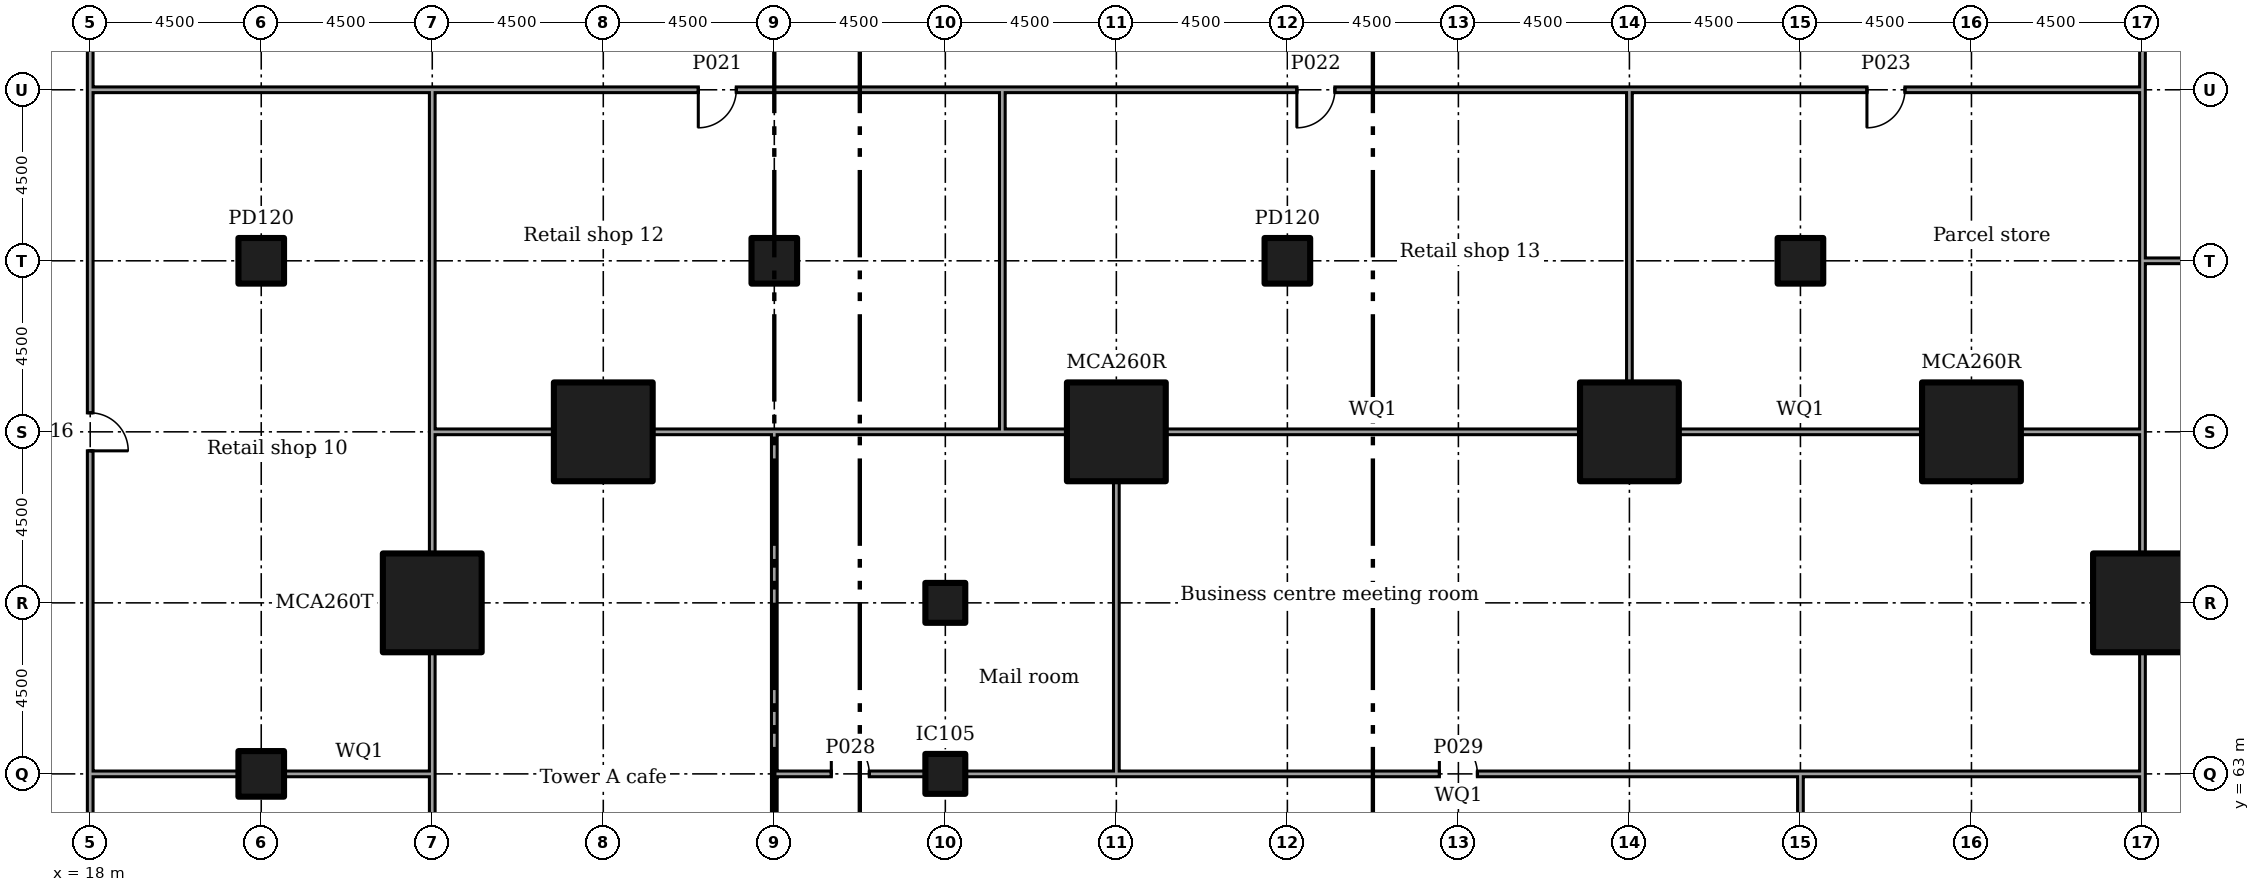
"""IFC4 building model, lengths in metres.
Left out: names, types, materials, properties, quantities, classifications, styles, units other than length and angle.
Written with IfcOpenShell. Run it as: python <this file> out.ifc"""

import sys

from ifc_helpers import new_model, si_unit, direction, frame, frame_2d, origin, origin_2d, place, context, subcontext, project, spatial, rectangle, extrude, element, fill, save


model = new_model("IFC4")
c1 = context("Model", 3, precision=1e-05, world=origin(), true_north=direction((0.0, 1.0)))
c2 = subcontext(c1, "Body", "Model", "MODEL_VIEW")
j1 = project(units=[si_unit("LENGTHUNIT", "METRE"), si_unit("PLANEANGLEUNIT", "RADIAN")], contexts=[c1])
p1 = place(None, origin())
s1 = spatial("IfcSite", under=j1, at=p1, CompositionType="ELEMENT")
p2 = place(p1, origin())
s2 = spatial("IfcBuilding", under=s1, at=p2, CompositionType="ELEMENT")
p3 = place(p2, origin())
s3 = spatial("IfcBuildingStorey", under=s2, at=p3, CompositionType="ELEMENT", Elevation=0.0)
for number, where in (
    (1, (27.0, 67.5, 0.0)),
    (2, (31.5, 72.0, 0.0)),
    (3, (45.0, 72.0, 0.0)),
    (4, (58.5, 72.0, 0.0)),
    (5, (67.5, 72.0, 0.0)),
    (6, (72.0, 67.5, 0.0)),
):
    element("IfcColumn", number, at=place(p3, frame(where)), inside=s3, PredefinedType="COLUMN", context=c2, shape_type="SweptSolid", body=[
        extrude(rectangle(XDim=2.6, YDim=2.6, at=origin_2d()), origin(), (0.0, 0.0, 1.0), 6.0),
    ])
for number, where in (
    (7, (40.5, 63.0, 0.0)),
    (8, (40.5, 67.5, 0.0)),
):
    element("IfcColumn", number, at=place(p3, frame(where)), inside=s3, PredefinedType="COLUMN", context=c2, shape_type="SweptSolid", body=[
        extrude(rectangle(XDim=1.05, YDim=1.05, at=origin_2d()), origin(), (0.0, 0.0, 1.0), 6.0),
    ])
for number, where in (
    (9, (22.5, 63.0, 0.0)),
    (10, (22.5, 76.5, 0.0)),
    (11, (36.0, 76.5, 0.0)),
    (12, (49.5, 76.5, 0.0)),
    (13, (63.0, 76.5, 0.0)),
):
    element("IfcColumn", number, at=place(p3, frame(where)), inside=s3, PredefinedType="COLUMN", context=c2, shape_type="SweptSolid", body=[
        extrude(rectangle(XDim=1.2, YDim=1.2, at=origin_2d()), origin(), (0.0, 0.0, 1.0), 6.0),
    ])
p4 = place(p3, frame((71.925, 76.5, 0.0)))
e14 = element("IfcWall", 14, at=p4, inside=s3, PredefinedType="PARTITIONING", context=c2, shape_type="SweptSolid", body=[
    extrude(rectangle(XDim=3.98, YDim=0.15, at=frame_2d((1.99, 0.0))), origin(), (0.0, 0.0, 1.0), 5.55),
])
p5 = place(p4, frame((1.125, 0.0, 0.0)))
e15 = element("IfcOpeningElement", 15, at=p5, cuts=e14, PredefinedType="OPENING", context=c2, shape_type="SweptSolid", body=[
    extrude(rectangle(XDim=1.8, YDim=2.1, at=frame_2d((0.9, 1.05))), frame((0.0, 0.085, 0.0), z_axis=(0.0, -1.0, 0.0), x_axis=(1.0, 0.0, 0.0)), (0.0, 0.0, 1.0), 0.17),
])
p6 = place(p3, frame((72.0, 71.925, 0.0), z_axis=(0.0, 0.0, 1.0), x_axis=(0.0, 1.0, 0.0)))
e16 = element("IfcWall", 16, at=p6, inside=s3, PredefinedType="PARTITIONING", context=c2, shape_type="SweptSolid", body=[
    extrude(rectangle(XDim=4.5, YDim=0.15, at=frame_2d((2.25, 0.0))), origin(), (0.0, 0.0, 1.0), 5.55),
])
p7 = place(p3, frame((72.0, 62.925, 0.0), z_axis=(0.0, 0.0, 1.0), x_axis=(0.0, 1.0, 0.0)))
e17 = element("IfcWall", 17, at=p7, inside=s3, PredefinedType="PARTITIONING", context=c2, shape_type="SweptSolid", body=[
    extrude(rectangle(XDim=3.28, YDim=0.15, at=frame_2d((1.64, 0.0))), origin(), (0.0, 0.0, 1.0), 5.55),
])
for number, where, z_axis, x_axis in (
    (18, (72.0, 68.795, 0.0), (0.0, 0.0, 1.0), (0.0, 1.0, 0.0)),
    (19, (72.0, 59.795, 0.0), (0.0, 0.0, 1.0), (0.0, 1.0, 0.0)),
):
    element("IfcWall", number, at=place(p3, frame(where, z_axis=z_axis, x_axis=x_axis)), inside=s3, PredefinedType="PARTITIONING", context=c2, shape_type="SweptSolid", body=[
        extrude(rectangle(XDim=3.205, YDim=0.15, at=frame_2d((1.603, 0.0))), origin(), (0.0, 0.0, 1.0), 5.55),
    ])
p8 = place(p3, frame((72.0, 80.925, 0.0), z_axis=(0.0, 0.0, 1.0), x_axis=(0.0, 1.0, 0.0)))
e20 = element("IfcWall", 20, at=p8, inside=s3, PredefinedType="PARTITIONING", context=c2, shape_type="SweptSolid", body=[
    extrude(rectangle(XDim=9.15, YDim=0.15, at=frame_2d((4.575, 0.0))), origin(), (0.0, 0.0, 1.0), 5.55),
])
p9 = place(p8, frame((3.675, 0.0, 0.0)))
e21 = element("IfcOpeningElement", 21, at=p9, cuts=e20, PredefinedType="OPENING", context=c2, shape_type="SweptSolid", body=[
    extrude(rectangle(XDim=1.8, YDim=2.1, at=frame_2d((0.9, 1.05))), frame((0.0, 0.085, 0.0), z_axis=(0.0, -1.0, 0.0), x_axis=(1.0, 0.0, 0.0)), (0.0, 0.0, 1.0), 0.17),
])
p10 = place(p3, frame((72.0, 76.5, 0.0), z_axis=(0.0, 0.0, 1.0), x_axis=(0.0, 1.0, 0.0)))
e22 = element("IfcWall", 22, at=p10, inside=s3, PredefinedType="PARTITIONING", context=c2, shape_type="SweptSolid", body=[
    extrude(rectangle(XDim=4.5, YDim=0.15, at=frame_2d((2.25, 0.0))), origin(), (0.0, 0.0, 1.0), 5.55),
])
p11 = place(p3, frame((18.0, 80.925, 0.0), z_axis=(0.0, 0.0, 1.0), x_axis=(0.0, 1.0, 0.0)))
e23 = element("IfcWall", 23, at=p11, inside=s3, PredefinedType="PARTITIONING", context=c2, shape_type="SweptSolid", body=[
    extrude(rectangle(XDim=9.15, YDim=0.15, at=frame_2d((4.575, 0.0))), origin(), (0.0, 0.0, 1.0), 5.55),
])
p12 = place(p11, frame((3.675, 0.0, 0.0)))
e24 = element("IfcOpeningElement", 24, at=p12, cuts=e23, PredefinedType="OPENING", context=c2, shape_type="SweptSolid", body=[
    extrude(rectangle(XDim=1.8, YDim=2.1, at=frame_2d((0.9, 1.05))), frame((0.0, 0.085, 0.0), z_axis=(0.0, -1.0, 0.0), x_axis=(1.0, 0.0, 0.0)), (0.0, 0.0, 1.0), 0.17),
])
p13 = place(p3, frame((18.0, 45.0, 0.0), z_axis=(0.0, 0.0, 1.0), x_axis=(0.0, 1.0, 0.0)))
e25 = element("IfcWall", 25, at=p13, inside=s3, PredefinedType="PARTITIONING", context=c2, shape_type="SweptSolid", body=[
    extrude(rectangle(XDim=18.075, YDim=0.15, at=frame_2d((9.038, 0.0))), origin(), (0.0, 0.0, 1.0), 5.55),
])
p14 = place(p13, frame((8.5, 0.0, 0.0)))
e26 = element("IfcOpeningElement", 26, at=p14, cuts=e25, PredefinedType="OPENING", context=c2, shape_type="SweptSolid", body=[
    extrude(rectangle(XDim=1.0, YDim=2.1, at=frame_2d((0.5, 1.05))), frame((0.0, 0.085, 0.0), z_axis=(0.0, -1.0, 0.0), x_axis=(1.0, 0.0, 0.0)), (0.0, 0.0, 1.0), 0.17),
])
p15 = place(p3, frame((18.0, 63.0, 0.0), z_axis=(0.0, 0.0, 1.0), x_axis=(0.0, 1.0, 0.0)))
e27 = element("IfcWall", 27, at=p15, inside=s3, PredefinedType="PARTITIONING", context=c2, shape_type="SweptSolid", body=[
    extrude(rectangle(XDim=18.0, YDim=0.15, at=frame_2d((9.0, 0.0))), origin(), (0.0, 0.0, 1.0), 5.55),
])
p16 = place(p15, frame((8.5, 0.0, 0.0)))
e28 = element("IfcOpeningElement", 28, at=p16, cuts=e27, PredefinedType="OPENING", context=c2, shape_type="SweptSolid", body=[
    extrude(rectangle(XDim=1.0, YDim=2.1, at=frame_2d((0.5, 1.05))), frame((0.0, 0.085, 0.0), z_axis=(0.0, -1.0, 0.0), x_axis=(1.0, 0.0, 0.0)), (0.0, 0.0, 1.0), 0.17),
])
p17 = place(p3, frame((18.075, 81.0, 0.0)))
e29 = element("IfcWall", 29, at=p17, inside=s3, PredefinedType="PARTITIONING", context=c2, shape_type="SweptSolid", body=[
    extrude(rectangle(XDim=9.0, YDim=0.15, at=frame_2d((4.5, 0.0))), origin(), (0.0, 0.0, 1.0), 5.55),
])
p18 = place(p3, frame((27.0, 81.0, 0.0)))
e30 = element("IfcWall", 30, at=p18, inside=s3, PredefinedType="PARTITIONING", context=c2, shape_type="SweptSolid", body=[
    extrude(rectangle(XDim=15.075, YDim=0.15, at=frame_2d((7.538, 0.0))), origin(), (0.0, 0.0, 1.0), 5.55),
])
p19 = place(p18, frame((7.0, 0.0, 0.0)))
e31 = element("IfcOpeningElement", 31, at=p19, cuts=e30, PredefinedType="OPENING", context=c2, shape_type="SweptSolid", body=[
    extrude(rectangle(XDim=1.0, YDim=2.1, at=frame_2d((0.5, 1.05))), frame((0.0, 0.085, 0.0), z_axis=(0.0, -1.0, 0.0), x_axis=(1.0, 0.0, 0.0)), (0.0, 0.0, 1.0), 0.17),
])
p20 = place(p3, frame((42.0, 81.0, 0.0)))
e32 = element("IfcWall", 32, at=p20, inside=s3, PredefinedType="PARTITIONING", context=c2, shape_type="SweptSolid", body=[
    extrude(rectangle(XDim=16.575, YDim=0.15, at=frame_2d((8.288, 0.0))), origin(), (0.0, 0.0, 1.0), 5.55),
])
p21 = place(p20, frame((7.75, 0.0, 0.0)))
e33 = element("IfcOpeningElement", 33, at=p21, cuts=e32, PredefinedType="OPENING", context=c2, shape_type="SweptSolid", body=[
    extrude(rectangle(XDim=1.0, YDim=2.1, at=frame_2d((0.5, 1.05))), frame((0.0, 0.085, 0.0), z_axis=(0.0, -1.0, 0.0), x_axis=(1.0, 0.0, 0.0)), (0.0, 0.0, 1.0), 0.17),
])
p22 = place(p3, frame((58.5, 81.0, 0.0)))
e34 = element("IfcWall", 34, at=p22, inside=s3, PredefinedType="PARTITIONING", context=c2, shape_type="SweptSolid", body=[
    extrude(rectangle(XDim=13.425, YDim=0.15, at=frame_2d((6.712, 0.0))), origin(), (0.0, 0.0, 1.0), 5.55),
])
p23 = place(p22, frame((6.25, 0.0, 0.0)))
e35 = element("IfcOpeningElement", 35, at=p23, cuts=e34, PredefinedType="OPENING", context=c2, shape_type="SweptSolid", body=[
    extrude(rectangle(XDim=1.0, YDim=2.1, at=frame_2d((0.5, 1.05))), frame((0.0, 0.085, 0.0), z_axis=(0.0, -1.0, 0.0), x_axis=(1.0, 0.0, 0.0)), (0.0, 0.0, 1.0), 0.17),
])
p24 = place(p3, frame((18.075, 63.0, 0.0)))
e36 = element("IfcWall", 36, at=p24, inside=s3, PredefinedType="PARTITIONING", context=c2, shape_type="SweptSolid", body=[
    extrude(rectangle(XDim=3.83, YDim=0.15, at=frame_2d((1.915, 0.0))), origin(), (0.0, 0.0, 1.0), 5.55),
])
p25 = place(p3, frame((23.095, 63.0, 0.0)))
e37 = element("IfcWall", 37, at=p25, inside=s3, PredefinedType="PARTITIONING", context=c2, shape_type="SweptSolid", body=[
    extrude(rectangle(XDim=3.98, YDim=0.15, at=frame_2d((1.99, 0.0))), origin(), (0.0, 0.0, 1.0), 5.55),
])
p26 = place(p3, frame((27.0, 59.795, 0.0), z_axis=(0.0, 0.0, 1.0), x_axis=(0.0, 1.0, 0.0)))
e38 = element("IfcWall", 38, at=p26, inside=s3, PredefinedType="PARTITIONING", context=c2, shape_type="SweptSolid", body=[
    extrude(rectangle(XDim=3.13, YDim=0.15, at=frame_2d((1.565, 0.0))), origin(), (0.0, 0.0, 1.0), 5.55),
])
p27 = place(p3, frame((27.0, 71.925, 0.0), z_axis=(0.0, 0.0, 1.0), x_axis=(0.0, 1.0, 0.0)))
e39 = element("IfcWall", 39, at=p27, inside=s3, PredefinedType="PARTITIONING", context=c2, shape_type="SweptSolid", body=[
    extrude(rectangle(XDim=9.0, YDim=0.15, at=frame_2d((4.5, 0.0))), origin(), (0.0, 0.0, 1.0), 5.55),
])
for number, where, z_axis, x_axis in (
    (40, (27.0, 63.0, 0.0), (0.0, 0.0, 1.0), (0.0, 1.0, 0.0)),
    (41, (27.0, 68.795, 0.0), (0.0, 0.0, 1.0), (0.0, 1.0, 0.0)),
):
    element("IfcWall", number, at=place(p3, frame(where, z_axis=z_axis, x_axis=x_axis)), inside=s3, PredefinedType="PARTITIONING", context=c2, shape_type="SweptSolid", body=[
        extrude(rectangle(XDim=3.205, YDim=0.15, at=frame_2d((1.603, 0.0))), origin(), (0.0, 0.0, 1.0), 5.55),
    ])
p28 = place(p3, frame((42.0, 71.925, 0.0), z_axis=(0.0, 0.0, 1.0), x_axis=(0.0, 1.0, 0.0)))
e42 = element("IfcWall", 42, at=p28, inside=s3, PredefinedType="PARTITIONING", context=c2, shape_type="SweptSolid", body=[
    extrude(rectangle(XDim=9.0, YDim=0.15, at=frame_2d((4.5, 0.0))), origin(), (0.0, 0.0, 1.0), 5.55),
])
p29 = place(p3, frame((27.075, 72.0, 0.0)))
e43 = element("IfcWall", 43, at=p29, inside=s3, PredefinedType="PARTITIONING", context=c2, shape_type="SweptSolid", body=[
    extrude(rectangle(XDim=3.13, YDim=0.15, at=frame_2d((1.565, 0.0))), origin(), (0.0, 0.0, 1.0), 5.55),
])
p30 = place(p3, frame((32.795, 72.0, 0.0)))
e44 = element("IfcWall", 44, at=p30, inside=s3, PredefinedType="PARTITIONING", context=c2, shape_type="SweptSolid", body=[
    extrude(rectangle(XDim=3.28, YDim=0.15, at=frame_2d((1.64, 0.0))), origin(), (0.0, 0.0, 1.0), 5.55),
])
p31 = place(p3, frame((36.0, 72.0, 0.0)))
e45 = element("IfcWall", 45, at=p31, inside=s3, PredefinedType="PARTITIONING", context=c2, shape_type="SweptSolid", body=[
    extrude(rectangle(XDim=6.0, YDim=0.15, at=frame_2d((3.0, 0.0))), origin(), (0.0, 0.0, 1.0), 5.55),
])
p32 = place(p3, frame((58.5, 73.295, 0.0), z_axis=(0.0, 0.0, 1.0), x_axis=(0.0, 1.0, 0.0)))
e46 = element("IfcWall", 46, at=p32, inside=s3, PredefinedType="PARTITIONING", context=c2, shape_type="SweptSolid", body=[
    extrude(rectangle(XDim=7.63, YDim=0.15, at=frame_2d((3.815, 0.0))), origin(), (0.0, 0.0, 1.0), 5.55),
])
p33 = place(p3, frame((42.075, 72.0, 0.0)))
e47 = element("IfcWall", 47, at=p33, inside=s3, PredefinedType="PARTITIONING", context=c2, shape_type="SweptSolid", body=[
    extrude(rectangle(XDim=1.63, YDim=0.15, at=frame_2d((0.815, 0.0))), origin(), (0.0, 0.0, 1.0), 5.55),
])
p34 = place(p3, frame((46.295, 72.0, 0.0)))
e48 = element("IfcWall", 48, at=p34, inside=s3, PredefinedType="PARTITIONING", context=c2, shape_type="SweptSolid", body=[
    extrude(rectangle(XDim=10.91, YDim=0.15, at=frame_2d((5.455, 0.0))), origin(), (0.0, 0.0, 1.0), 5.55),
])
p35 = place(p3, frame((59.795, 72.0, 0.0)))
e49 = element("IfcWall", 49, at=p35, inside=s3, PredefinedType="PARTITIONING", context=c2, shape_type="SweptSolid", body=[
    extrude(rectangle(XDim=6.41, YDim=0.15, at=frame_2d((3.205, 0.0))), origin(), (0.0, 0.0, 1.0), 5.55),
])
p36 = place(p3, frame((68.795, 72.0, 0.0)))
e50 = element("IfcWall", 50, at=p36, inside=s3, PredefinedType="PARTITIONING", context=c2, shape_type="SweptSolid", body=[
    extrude(rectangle(XDim=3.13, YDim=0.15, at=frame_2d((1.565, 0.0))), origin(), (0.0, 0.0, 1.0), 5.55),
])
p37 = place(p3, frame((36.0, 62.925, 0.0), z_axis=(0.0, 0.0, 1.0), x_axis=(0.0, 1.0, 0.0)))
e51 = element("IfcWall", 51, at=p37, inside=s3, PredefinedType="PARTITIONING", context=c2, shape_type="SweptSolid", body=[
    extrude(rectangle(XDim=9.0, YDim=0.15, at=frame_2d((4.5, 0.0))), origin(), (0.0, 0.0, 1.0), 5.55),
])
p38 = place(p3, frame((36.0, 45.0, 0.0), z_axis=(0.0, 0.0, 1.0), x_axis=(0.0, 1.0, 0.0)))
e52 = element("IfcWall", 52, at=p38, inside=s3, PredefinedType="PARTITIONING", context=c2, shape_type="SweptSolid", body=[
    extrude(rectangle(XDim=18.0, YDim=0.15, at=frame_2d((9.0, 0.0))), origin(), (0.0, 0.0, 1.0), 5.55),
])
p39 = place(p38, frame((8.5, 0.0, 0.0)))
e53 = element("IfcOpeningElement", 53, at=p39, cuts=e52, PredefinedType="OPENING", context=c2, shape_type="SweptSolid", body=[
    extrude(rectangle(XDim=1.0, YDim=2.1, at=frame_2d((0.5, 1.05))), frame((0.0, 0.085, 0.0), z_axis=(0.0, -1.0, 0.0), x_axis=(1.0, 0.0, 0.0)), (0.0, 0.0, 1.0), 0.17),
])
p40 = place(p3, frame((45.0, 62.925, 0.0), z_axis=(0.0, 0.0, 1.0), x_axis=(0.0, 1.0, 0.0)))
e54 = element("IfcWall", 54, at=p40, inside=s3, PredefinedType="PARTITIONING", context=c2, shape_type="SweptSolid", body=[
    extrude(rectangle(XDim=7.78, YDim=0.15, at=frame_2d((3.89, 0.0))), origin(), (0.0, 0.0, 1.0), 5.55),
])
p41 = place(p3, frame((36.075, 63.0, 0.0)))
e55 = element("IfcWall", 55, at=p41, inside=s3, PredefinedType="PARTITIONING", context=c2, shape_type="SweptSolid", body=[
    extrude(rectangle(XDim=3.905, YDim=0.15, at=frame_2d((1.953, 0.0))), origin(), (0.0, 0.0, 1.0), 5.55),
])
p42 = place(p41, frame((1.425, 0.0, 0.0)))
e56 = element("IfcOpeningElement", 56, at=p42, cuts=e55, PredefinedType="OPENING", context=c2, shape_type="SweptSolid", body=[
    extrude(rectangle(XDim=1.0, YDim=2.1, at=frame_2d((0.5, 1.05))), frame((0.0, 0.085, 0.0), z_axis=(0.0, -1.0, 0.0), x_axis=(1.0, 0.0, 0.0)), (0.0, 0.0, 1.0), 0.17),
])
p43 = place(p3, frame((41.02, 63.0, 0.0)))
e57 = element("IfcWall", 57, at=p43, inside=s3, PredefinedType="PARTITIONING", context=c2, shape_type="SweptSolid", body=[
    extrude(rectangle(XDim=3.905, YDim=0.15, at=frame_2d((1.953, 0.0))), origin(), (0.0, 0.0, 1.0), 5.55),
])
p44 = place(p3, frame((62.925, 63.0, 0.0)))
e58 = element("IfcWall", 58, at=p44, inside=s3, PredefinedType="PARTITIONING", context=c2, shape_type="SweptSolid", body=[
    extrude(rectangle(XDim=9.0, YDim=0.15, at=frame_2d((4.5, 0.0))), origin(), (0.0, 0.0, 1.0), 5.55),
])
p45 = place(p3, frame((45.0, 63.0, 0.0)))
e59 = element("IfcWall", 59, at=p45, inside=s3, PredefinedType="PARTITIONING", context=c2, shape_type="SweptSolid", body=[
    extrude(rectangle(XDim=18.0, YDim=0.15, at=frame_2d((9.0, 0.0))), origin(), (0.0, 0.0, 1.0), 5.55),
])
p46 = place(p45, frame((8.5, 0.0, 0.0)))
e60 = element("IfcOpeningElement", 60, at=p46, cuts=e59, PredefinedType="OPENING", context=c2, shape_type="SweptSolid", body=[
    extrude(rectangle(XDim=1.0, YDim=2.1, at=frame_2d((0.5, 1.05))), frame((0.0, 0.085, 0.0), z_axis=(0.0, -1.0, 0.0), x_axis=(1.0, 0.0, 0.0)), (0.0, 0.0, 1.0), 0.17),
])
p47 = place(p3, frame((63.0, 59.02, 0.0), z_axis=(0.0, 0.0, 1.0), x_axis=(0.0, 1.0, 0.0)))
e61 = element("IfcWall", 61, at=p47, inside=s3, PredefinedType="PARTITIONING", context=c2, shape_type="SweptSolid", body=[
    extrude(rectangle(XDim=3.905, YDim=0.15, at=frame_2d((1.953, 0.0))), origin(), (0.0, 0.0, 1.0), 5.55),
])
p48 = place(p47, frame((1.1, 0.0, 0.0)))
e62 = element("IfcOpeningElement", 62, at=p48, cuts=e61, PredefinedType="OPENING", context=c2, shape_type="SweptSolid", body=[
    extrude(rectangle(XDim=1.8, YDim=2.1, at=frame_2d((0.9, 1.05))), frame((0.0, 0.085, 0.0), z_axis=(0.0, -1.0, 0.0), x_axis=(1.0, 0.0, 0.0)), (0.0, 0.0, 1.0), 0.17),
])
p49 = place(p16, frame((1.0, 0.0, 0.0), x_axis=(-1.0, 0.0, 0.0)))
e63 = element("IfcDoor", 63, at=p49, inside=s3, OperationType="SINGLE_SWING_LEFT", PredefinedType="DOOR", context=c2, shape_type="SweptSolid", body=[
    extrude(rectangle(XDim=1.0, YDim=2.1, at=frame_2d((0.5, 1.05))), frame((0.0, 0.025, 0.0), z_axis=(0.0, -1.0, 0.0), x_axis=(1.0, 0.0, 0.0)), (0.0, 0.0, 1.0), 0.05),
])
fill(e28, e63)
p50 = place(p19, frame((1.0, 0.0, 0.0), x_axis=(-1.0, 0.0, 0.0)))
e64 = element("IfcDoor", 64, at=p50, inside=s3, OperationType="SINGLE_SWING_LEFT", PredefinedType="DOOR", context=c2, shape_type="SweptSolid", body=[
    extrude(rectangle(XDim=1.0, YDim=2.1, at=frame_2d((0.5, 1.05))), frame((0.0, 0.025, 0.0), z_axis=(0.0, -1.0, 0.0), x_axis=(1.0, 0.0, 0.0)), (0.0, 0.0, 1.0), 0.05),
])
fill(e31, e64)
p51 = place(p21, frame((1.0, 0.0, 0.0), x_axis=(-1.0, 0.0, 0.0)))
e65 = element("IfcDoor", 65, at=p51, inside=s3, OperationType="SINGLE_SWING_LEFT", PredefinedType="DOOR", context=c2, shape_type="SweptSolid", body=[
    extrude(rectangle(XDim=1.0, YDim=2.1, at=frame_2d((0.5, 1.05))), frame((0.0, 0.025, 0.0), z_axis=(0.0, -1.0, 0.0), x_axis=(1.0, 0.0, 0.0)), (0.0, 0.0, 1.0), 0.05),
])
fill(e33, e65)
p52 = place(p23, frame((1.0, 0.0, 0.0), x_axis=(-1.0, 0.0, 0.0)))
e66 = element("IfcDoor", 66, at=p52, inside=s3, OperationType="SINGLE_SWING_LEFT", PredefinedType="DOOR", context=c2, shape_type="SweptSolid", body=[
    extrude(rectangle(XDim=1.0, YDim=2.1, at=frame_2d((0.5, 1.05))), frame((0.0, 0.025, 0.0), z_axis=(0.0, -1.0, 0.0), x_axis=(1.0, 0.0, 0.0)), (0.0, 0.0, 1.0), 0.05),
])
fill(e35, e66)
p53 = place(p42, origin())
e67 = element("IfcDoor", 67, at=p53, inside=s3, OperationType="SINGLE_SWING_RIGHT", PredefinedType="DOOR", context=c2, shape_type="SweptSolid", body=[
    extrude(rectangle(XDim=1.0, YDim=2.1, at=frame_2d((0.5, 1.05))), frame((0.0, 0.025, 0.0), z_axis=(0.0, -1.0, 0.0), x_axis=(1.0, 0.0, 0.0)), (0.0, 0.0, 1.0), 0.05),
])
fill(e56, e67)
p54 = place(p46, origin())
e68 = element("IfcDoor", 68, at=p54, inside=s3, OperationType="SINGLE_SWING_RIGHT", PredefinedType="DOOR", context=c2, shape_type="SweptSolid", body=[
    extrude(rectangle(XDim=1.0, YDim=2.1, at=frame_2d((0.5, 1.05))), frame((0.0, 0.025, 0.0), z_axis=(0.0, -1.0, 0.0), x_axis=(1.0, 0.0, 0.0)), (0.0, 0.0, 1.0), 0.05),
])
fill(e60, e68)
save(model, sys.argv[1])
